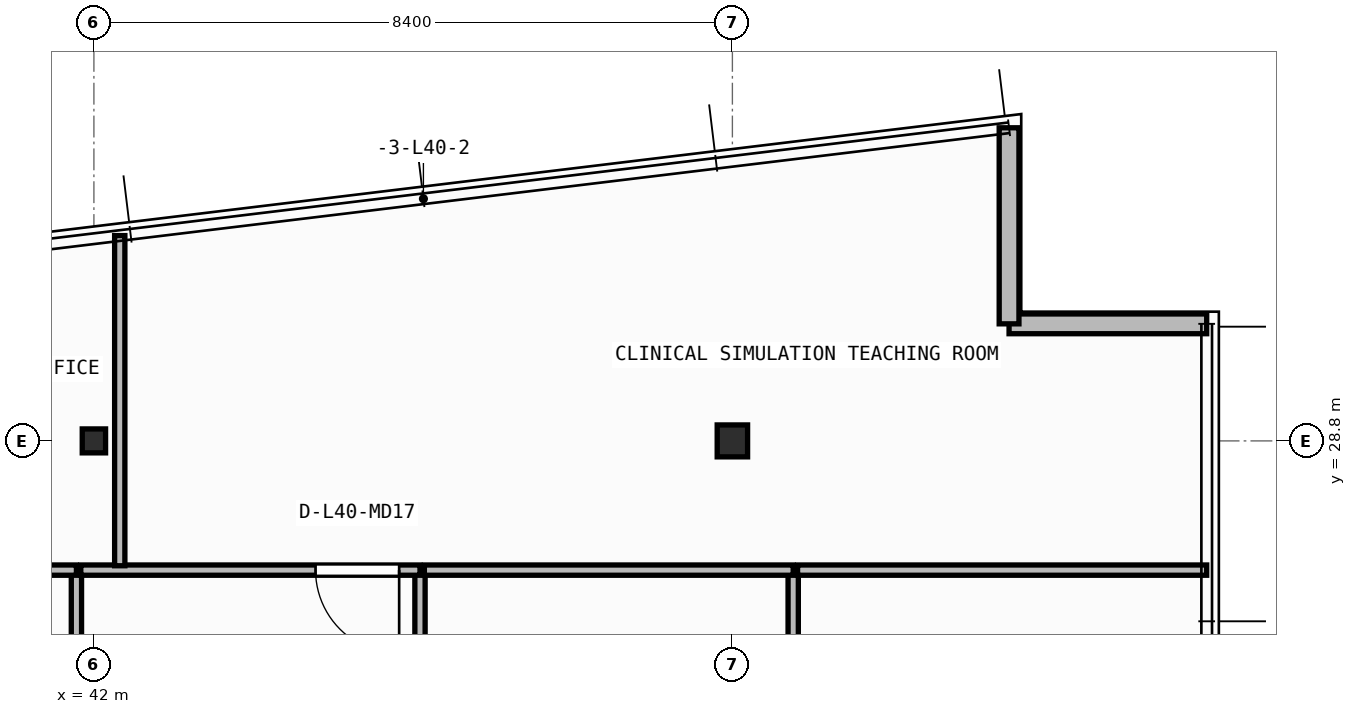
"""IFC4 building model, lengths in metres.
Left out: names, types, materials, properties, quantities, classifications, styles, units other than length and angle.
Written with IfcOpenShell. Run it as: python <this file> out.ifc"""

import sys

from ifc_helpers import new_model, si_unit, direction, frame, frame_2d, origin, origin_2d, place, context, subcontext, project, spatial, rectangle, i_section, extrude, element, fill, save


model = new_model("IFC4")
c1 = context("Model", 3, precision=1e-05, world=origin(), true_north=direction((0.0, 1.0)))
c2 = subcontext(c1, "Body", "Model", "MODEL_VIEW")
j1 = project(units=[si_unit("LENGTHUNIT", "METRE"), si_unit("PLANEANGLEUNIT", "RADIAN")], contexts=[c1])
p1 = place(None, origin())
s1 = spatial("IfcSite", under=j1, at=p1, CompositionType="ELEMENT")
p2 = place(p1, origin())
s2 = spatial("IfcBuilding", under=s1, at=p2, CompositionType="ELEMENT")
p3 = place(p2, frame((0.0, 0.0, 162.6)))
s3 = spatial("IfcBuildingStorey", under=s2, at=p3, CompositionType="ELEMENT", Elevation=162.6)
p4 = place(p3, frame((42.0, 28.8, 0.0), z_axis=(0.0, 0.0, 1.0), x_axis=(1.0, 0.0, 0.0)))
e1 = element("IfcColumn", 1, at=p4, inside=s3, PredefinedType="COLUMN", context=c2, shape_type="SweptSolid", body=[
    extrude(i_section(OverallWidth=0.307, OverallDepth=0.315, WebThickness=0.012, FlangeThickness=0.019, FilletRadius=0.017, at=origin_2d()), origin(), (0.0, 0.0, 1.0), 3.95),
])
p5 = place(p3, frame((50.4, 28.8, 0.0), z_axis=(0.0, 0.0, 1.0), x_axis=(1.0, 0.0, 0.0)))
e2 = element("IfcColumn", 2, at=p5, inside=s3, PredefinedType="COLUMN", context=c2, shape_type="SweptSolid", body=[
    extrude(i_section(OverallWidth=0.4, OverallDepth=0.42, WebThickness=0.025, FlangeThickness=0.04, at=origin_2d()), origin(), (0.0, 0.0, 1.0), 3.95),
])
p6 = place(p3, frame((56.64, 30.34, 0.0), z_axis=(0.0, 0.0, 1.0), x_axis=(-1.0, 0.0, 0.0)))
e3 = element("IfcWall", 3, at=p6, inside=s3, PredefinedType="STANDARD", context=c2, shape_type="SweptSolid", body=[
    extrude(rectangle(XDim=2.6, YDim=0.26, at=frame_2d((1.3, 0.0))), origin(), (0.0, 0.0, 1.0), 3.71),
])
p7 = place(p3, frame((54.04, 30.34, 0.0), z_axis=(0.0, 0.0, 1.0), x_axis=(0.0, 1.0, 0.0)))
e4 = element("IfcWall", 4, at=p7, inside=s3, PredefinedType="STANDARD", context=c2, shape_type="SweptSolid", body=[
    extrude(rectangle(XDim=2.579, YDim=0.26, at=frame_2d((1.29, 0.0))), origin(), (0.0, 0.0, 1.0), 3.71),
])
p8 = place(p3, frame((41.77, 20.715, 0.0), z_axis=(0.0, 0.0, 1.0), x_axis=(0.0, 1.0, 0.0)))
e5 = element("IfcWall", 5, at=p8, inside=s3, PredefinedType="PARTITIONING", context=c2, shape_type="SweptSolid", body=[
    extrude(rectangle(XDim=6.385, YDim=0.135, at=frame_2d((3.192, 0.0))), origin(), (0.0, 0.0, 1.0), 3.152),
])
p9 = place(p3, frame((41.77, 27.1, 0.0), z_axis=(0.0, 0.0, 1.0), x_axis=(-1.0, 0.0, 0.0)))
e6 = element("IfcWall", 6, at=p9, inside=s3, PredefinedType="PARTITIONING", context=c2, shape_type="SweptSolid", body=[
    extrude(rectangle(XDim=5.252, YDim=0.135, at=frame_2d((2.626, 0.0))), origin(), (0.0, 0.0, 1.0), 3.71),
])
p10 = place(p3, frame((46.29, 20.715, 0.0), z_axis=(0.0, 0.0, 1.0), x_axis=(0.0, 1.0, 0.0)))
e7 = element("IfcWall", 7, at=p10, inside=s3, PredefinedType="PARTITIONING", context=c2, shape_type="SweptSolid", body=[
    extrude(rectangle(XDim=6.385, YDim=0.135, at=frame_2d((3.192, 0.0))), origin(), (0.0, 0.0, 1.0), 3.71),
])
p11 = place(p3, frame((46.29, 27.1, 0.0), z_axis=(0.0, 0.0, 1.0), x_axis=(-1.0, 0.0, 0.0)))
e8 = element("IfcWall", 8, at=p11, inside=s3, PredefinedType="PARTITIONING", context=c2, shape_type="SweptSolid", body=[
    extrude(rectangle(XDim=4.463, YDim=0.135, at=frame_2d((2.231, 0.0))), origin(), (0.0, 0.0, 1.0), 3.71),
])
p12 = place(p11, frame((0.274, 0.0, 0.0)))
e9 = element("IfcOpeningElement", 9, at=p12, cuts=e8, PredefinedType="OPENING", context=c2, shape_type="SweptSolid", body=[
    extrude(rectangle(XDim=1.1, YDim=2.1, at=frame_2d((0.55, 1.05))), frame((0.0, 0.077, 0.0), z_axis=(0.0, -1.0, 0.0), x_axis=(1.0, 0.0, 0.0)), (0.0, 0.0, 1.0), 0.155),
])
p13 = place(p3, frame((51.2, 20.715, 0.0), z_axis=(0.0, 0.0, 1.0), x_axis=(0.0, 1.0, 0.0)))
e10 = element("IfcWall", 10, at=p13, inside=s3, PredefinedType="PARTITIONING", context=c2, shape_type="SweptSolid", body=[
    extrude(rectangle(XDim=6.385, YDim=0.135, at=frame_2d((3.192, 0.0))), origin(), (0.0, 0.0, 1.0), 3.71),
])
p14 = place(p3, frame((51.2, 27.1, 0.0), z_axis=(0.0, 0.0, 1.0), x_axis=(-1.0, 0.0, 0.0)))
e11 = element("IfcWall", 11, at=p14, inside=s3, PredefinedType="PARTITIONING", context=c2, shape_type="SweptSolid", body=[
    extrude(rectangle(XDim=4.853, YDim=0.135, at=frame_2d((2.426, 0.0))), origin(), (0.0, 0.0, 1.0), 3.71),
])
p15 = place(p3, frame((56.64, 27.1, 0.0), z_axis=(0.0, 0.0, 1.0), x_axis=(-1.0, 0.0, 0.0)))
e12 = element("IfcWall", 12, at=p15, inside=s3, PredefinedType="PARTITIONING", context=c2, shape_type="SweptSolid", body=[
    extrude(rectangle(XDim=5.382, YDim=0.135, at=frame_2d((2.691, 0.0))), origin(), (0.0, 0.0, 1.0), 3.71),
])
p16 = place(p3, frame((42.34, 27.157, 0.0), z_axis=(0.0, 0.0, 1.0), x_axis=(0.0, 1.0, 0.0)))
e13 = element("IfcWall", 13, at=p16, inside=s3, PredefinedType="PARTITIONING", context=c2, shape_type="SweptSolid", body=[
    extrude(rectangle(XDim=4.344, YDim=0.135, at=frame_2d((2.172, 0.0))), origin(), (0.0, 0.0, 1.0), 3.152),
])
p17 = place(p12, origin())
e14 = element("IfcDoor", 14, at=p17, inside=s3, OperationType="SINGLE_SWING_LEFT", PredefinedType="DOOR", context=c2, shape_type="SweptSolid", body=[
    extrude(rectangle(XDim=1.1, YDim=2.1, at=frame_2d((0.55, 1.05))), frame((0.0, 0.025, 0.0), z_axis=(0.0, -1.0, 0.0), x_axis=(1.0, 0.0, 0.0)), (0.0, 0.0, 1.0), 0.05),
])
fill(e9, e14)
save(model, sys.argv[1])
